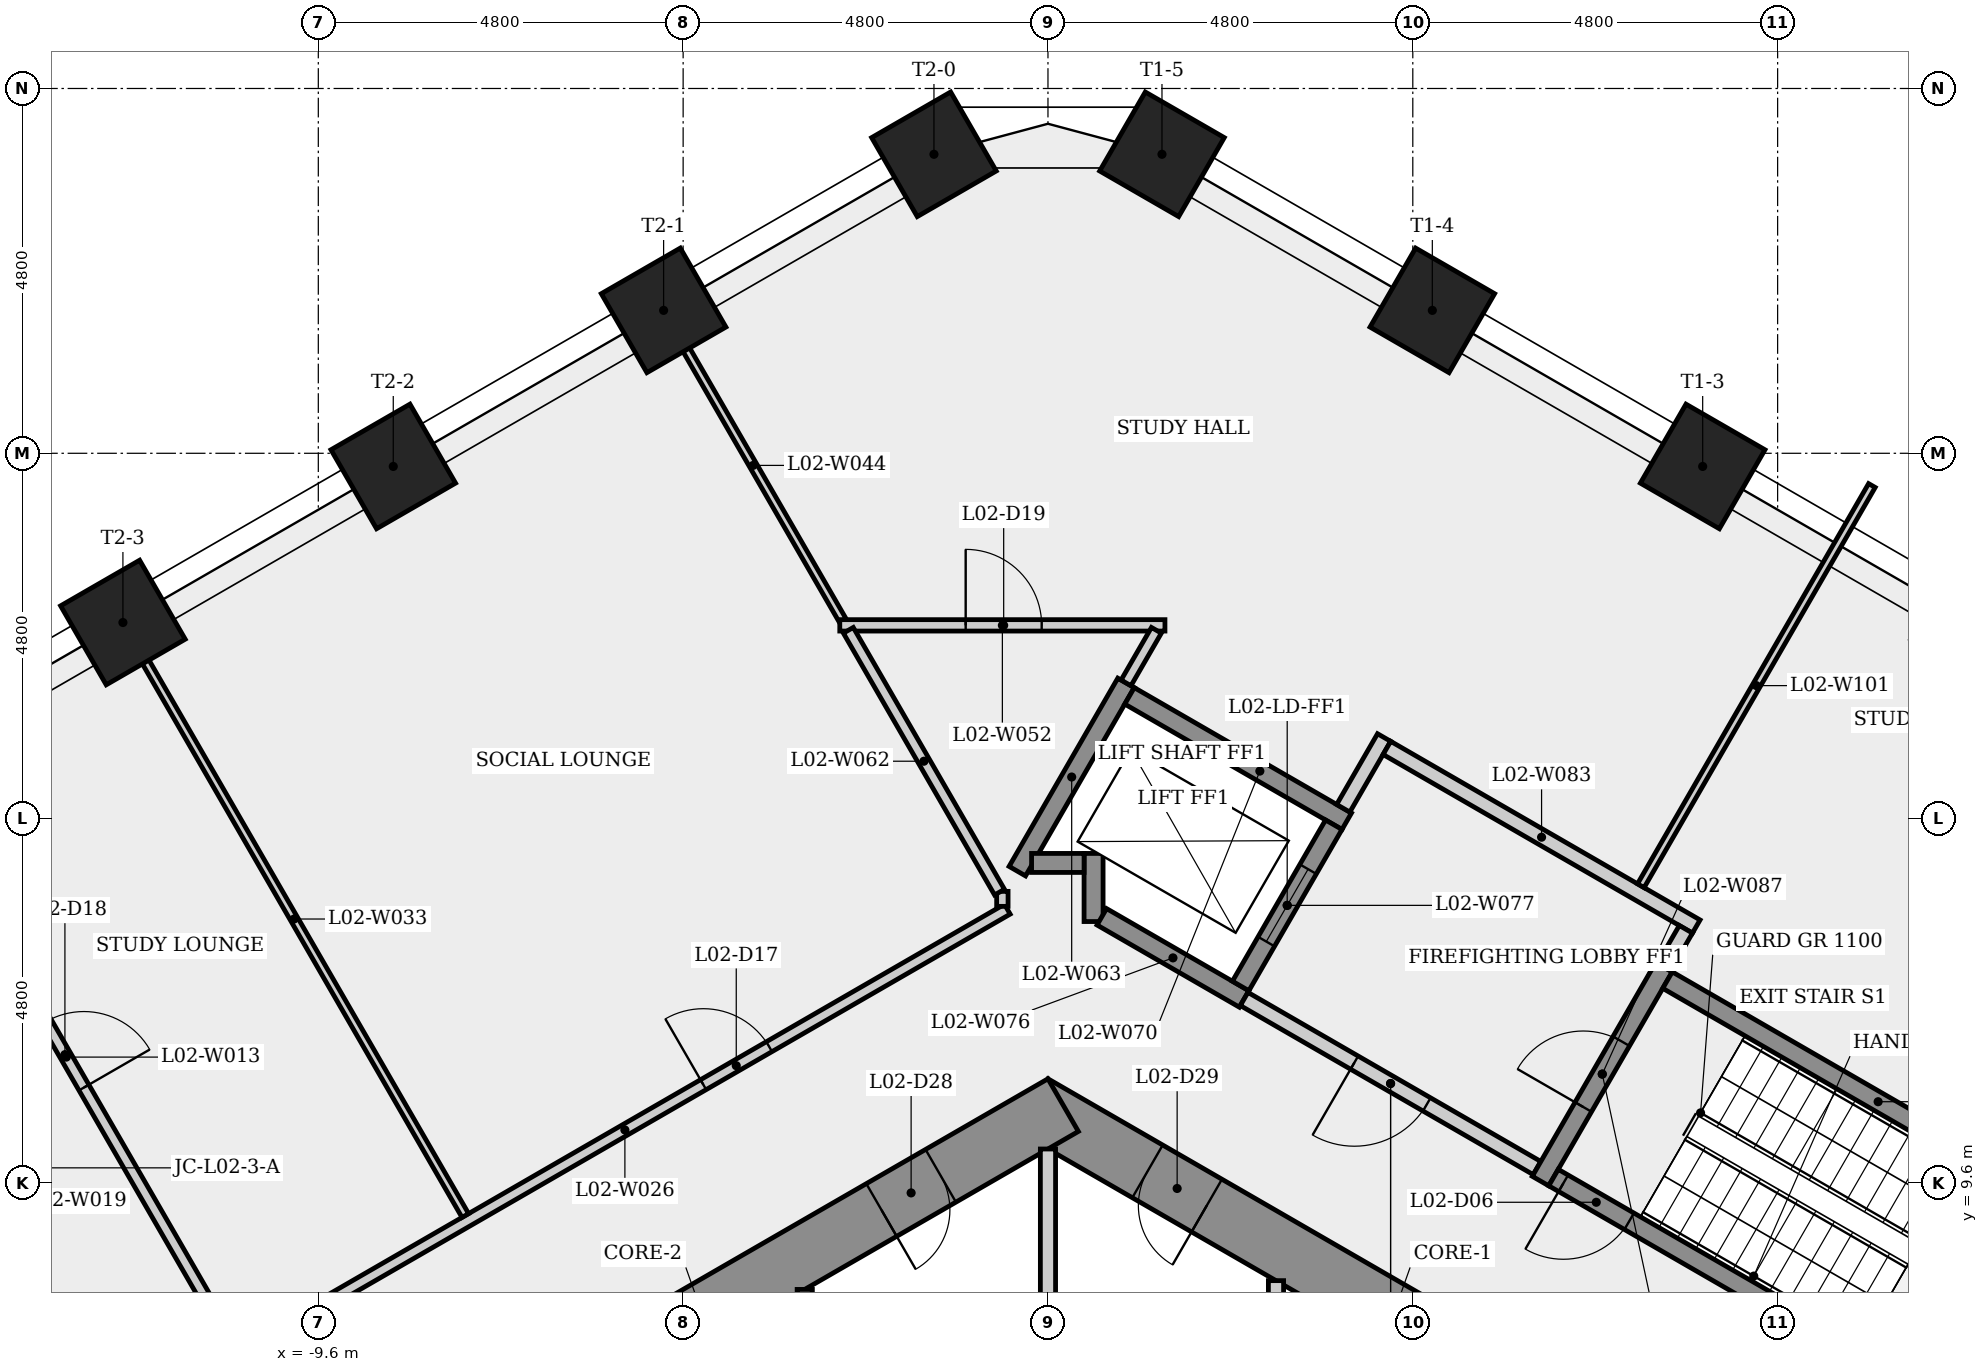
"""IFC4 building model, lengths in metres.
Left out: names, types, materials, properties, quantities, classifications, styles, units other than length and angle.
Written with IfcOpenShell. Run it as: python <this file> out.ifc"""

import sys

from ifc_helpers import new_model, si_unit, direction, frame, frame_2d, origin, origin_2d, place, context, subcontext, project, spatial, rectangle, extrude, element, fill, save


model = new_model("IFC4")
c1 = context("Model", 3, precision=1e-05, world=origin(), true_north=direction((0.0, 1.0)))
c2 = subcontext(c1, "Body", "Model", "MODEL_VIEW")
j1 = project(units=[si_unit("LENGTHUNIT", "METRE"), si_unit("PLANEANGLEUNIT", "RADIAN")], contexts=[c1])
p1 = place(None, origin())
s1 = spatial("IfcSite", under=j1, at=p1, CompositionType="ELEMENT")
p2 = place(p1, origin())
s2 = spatial("IfcBuilding", under=s1, at=p2, CompositionType="ELEMENT")
p3 = place(p2, frame((0.0, 0.0, 11.5)))
s3 = spatial("IfcBuildingStorey", under=s2, at=p3, CompositionType="ELEMENT", Elevation=11.5)
p4 = place(p3, frame((9.3, 5.138, 0.0), z_axis=(0.0, 0.0, 1.0), x_axis=(-0.866023993627, 0.500002442456, 0.0)))
e1 = element("IfcWall", 1, at=p4, inside=s3, PredefinedType="SHEAR", context=c2, shape_type="SweptSolid", body=[
    extrude(rectangle(XDim=10.97, YDim=0.8, at=frame_2d((5.485, 0.0))), origin(), (0.0, 0.0, 1.0), 4.5),
])
p5 = place(p4, frame((8.326, 0.0, 0.0)))
e2 = element("IfcOpeningElement", 2, at=p5, cuts=e1, PredefinedType="OPENING", context=c2, shape_type="SweptSolid", body=[
    extrude(rectangle(XDim=0.9, YDim=2.1, at=frame_2d((0.45, 1.05))), frame((0.0, 0.41, 0.0), z_axis=(0.0, -1.0, 0.0), x_axis=(1.0, 0.0, 0.0)), (0.0, 0.0, 1.0), 0.82),
])
p6 = place(p4, frame((2.091, 0.0, 0.0)))
e3 = element("IfcOpeningElement", 3, at=p6, cuts=e1, PredefinedType="OPENING", context=c2, shape_type="SweptSolid", body=[
    extrude(rectangle(XDim=0.9, YDim=2.1, at=frame_2d((0.45, 1.05))), frame((0.0, 0.41, 0.0), z_axis=(0.0, -1.0, 0.0), x_axis=(1.0, 0.0, 0.0)), (0.0, 0.0, 1.0), 0.82),
])
p7 = place(p3, frame((0.2, 10.623, 0.0), z_axis=(0.0, 0.0, 1.0), x_axis=(-0.866023993627, -0.500002442456, 0.0)))
e4 = element("IfcWall", 4, at=p7, inside=s3, PredefinedType="SHEAR", context=c2, shape_type="SweptSolid", body=[
    extrude(rectangle(XDim=10.97, YDim=0.8, at=frame_2d((5.485, 0.0))), origin(), (0.0, 0.0, 1.0), 4.5),
])
p8 = place(p7, frame((7.944, 0.0, 0.0)))
e5 = element("IfcOpeningElement", 5, at=p8, cuts=e4, PredefinedType="OPENING", context=c2, shape_type="SweptSolid", body=[
    extrude(rectangle(XDim=0.9, YDim=2.1, at=frame_2d((0.45, 1.05))), frame((0.0, 0.41, 0.0), z_axis=(0.0, -1.0, 0.0), x_axis=(1.0, 0.0, 0.0)), (0.0, 0.0, 1.0), 0.82),
])
p9 = place(p7, frame((1.86, 0.0, 0.0)))
e6 = element("IfcOpeningElement", 6, at=p9, cuts=e4, PredefinedType="OPENING", context=c2, shape_type="SweptSolid", body=[
    extrude(rectangle(XDim=0.9, YDim=2.1, at=frame_2d((0.45, 1.05))), frame((0.0, 0.41, 0.0), z_axis=(0.0, -1.0, 0.0), x_axis=(1.0, 0.0, 0.0)), (0.0, 0.0, 1.0), 0.82),
])
for number, where, z_axis, x_axis in (
    (7, (8.614, 19.027, 0.0), (0.0, 0.0, 1.0), (0.5, 0.866, 0.0)),
    (8, (5.057, 21.08, 0.0), (0.0, 0.0, 1.0), (0.5, 0.866, 0.0)),
    (9, (1.5, 23.134, 0.0), (0.0, 0.0, 1.0), (0.5, 0.866, 0.0)),
    (10, (-1.5, 23.134, 0.0), (0.0, 0.0, 1.0), (-0.5, 0.866, 0.0)),
    (11, (-5.057, 21.08, 0.0), (0.0, 0.0, 1.0), (-0.5, 0.866, 0.0)),
    (12, (-8.614, 19.027, 0.0), (0.0, 0.0, 1.0), (-0.5, 0.866, 0.0)),
    (13, (-12.171, 16.973, 0.0), (0.0, 0.0, 1.0), (-0.5, 0.866, 0.0)),
):
    element("IfcColumn", number, at=place(p3, frame(where, z_axis=z_axis, x_axis=x_axis)), inside=s3, PredefinedType="COLUMN", context=c2, shape_type="SweptSolid", body=[
        extrude(rectangle(XDim=1.2, YDim=1.2, at=origin_2d()), origin(), (0.0, 0.0, 1.0), 4.5),
    ])
p10 = place(p3, frame((-15.205, 15.221, 0.0), z_axis=(0.0, 0.0, 1.0), x_axis=(0.500006245143, -0.86602179812, 0.0)))
e14 = element("IfcWall", 14, at=p10, inside=s3, PredefinedType="PARTITIONING", context=c2, shape_type="SweptSolid", body=[
    extrude(rectangle(XDim=9.16, YDim=0.15, at=frame_2d((4.58, 0.0))), origin(), (0.0, 0.0, 1.0), 4.1),
])
p11 = place(p10, frame((4.042, 0.0, 0.0)))
e15 = element("IfcOpeningElement", 15, at=p11, cuts=e14, PredefinedType="OPENING", context=c2, shape_type="SweptSolid", body=[
    extrude(rectangle(XDim=1.0, YDim=2.1, at=frame_2d((0.5, 1.05))), frame((0.0, 0.085, 0.0), z_axis=(0.0, -1.0, 0.0), x_axis=(1.0, 0.0, 0.0)), (0.0, 0.0, 1.0), 0.17),
])
p12 = place(p3, frame((-10.598, 7.391, 0.0), z_axis=(0.0, 0.0, 1.0), x_axis=(0.866022183431, 0.500005577774, 0.0)))
e16 = element("IfcWall", 16, at=p12, inside=s3, PredefinedType="PARTITIONING", context=c2, shape_type="SweptSolid", body=[
    extrude(rectangle(XDim=11.619, YDim=0.15, at=frame_2d((5.81, 0.0))), origin(), (0.0, 0.0, 1.0), 4.1),
])
p13 = place(p12, frame((7.001, 0.0, 0.0)))
e17 = element("IfcOpeningElement", 17, at=p13, cuts=e16, PredefinedType="OPENING", context=c2, shape_type="SweptSolid", body=[
    extrude(rectangle(XDim=1.0, YDim=2.1, at=frame_2d((0.5, 1.05))), frame((0.0, 0.085, 0.0), z_axis=(0.0, -1.0, 0.0), x_axis=(1.0, 0.0, 0.0)), (0.0, 0.0, 1.0), 0.17),
])
p14 = place(p3, frame((-7.666, 9.171, 0.0), z_axis=(0.0, 0.0, 1.0), x_axis=(-0.500009404554, 0.866019973994, 0.0)))
e18 = element("IfcWall", 18, at=p14, inside=s3, PredefinedType="PARTITIONING", context=c2, shape_type="SweptSolid", body=[
    extrude(rectangle(XDim=9.01, YDim=0.1, at=frame_2d((4.505, 0.0))), origin(), (0.0, 0.0, 1.0), 4.1),
])
p15 = place(p3, frame((-5.057, 21.08, 0.0), z_axis=(0.0, 0.0, 1.0), x_axis=(0.500018540756, -0.866014699009, 0.0)))
e19 = element("IfcWall", 19, at=p15, inside=s3, PredefinedType="PARTITIONING", context=c2, shape_type="SweptSolid", body=[
    extrude(rectangle(XDim=4.711, YDim=0.1, at=frame_2d((2.355, 0.0))), origin(), (0.0, 0.0, 1.0), 4.1),
])
p16 = place(p3, frame((-3.2, 8.198, 0.0), z_axis=(0.0, 0.0, 1.0), x_axis=(0.0, -1.0, 0.0)))
e20 = element("IfcWall", 20, at=p16, inside=s3, PredefinedType="PARTITIONING", context=c2, shape_type="SweptSolid", body=[
    extrude(rectangle(XDim=2.924, YDim=0.2, at=frame_2d((1.462, 0.0))), origin(), (0.0, 0.0, 1.0), 4.1),
])
p17 = place(p3, frame((-2.739, 16.936, 0.0), z_axis=(0.0, 0.0, 1.0), x_axis=(1.0, 0.0, 0.0)))
e21 = element("IfcWall", 21, at=p17, inside=s3, PredefinedType="PARTITIONING", context=c2, shape_type="SweptSolid", body=[
    extrude(rectangle(XDim=4.278, YDim=0.15, at=frame_2d((2.139, 0.0))), origin(), (0.0, 0.0, 1.0), 4.1),
])
p18 = place(p17, frame((1.656, 0.0, 0.0)))
e22 = element("IfcOpeningElement", 22, at=p18, cuts=e21, PredefinedType="OPENING", context=c2, shape_type="SweptSolid", body=[
    extrude(rectangle(XDim=1.0, YDim=2.1, at=frame_2d((0.5, 1.05))), frame((0.0, 0.085, 0.0), z_axis=(0.0, -1.0, 0.0), x_axis=(1.0, 0.0, 0.0)), (0.0, 0.0, 1.0), 0.17),
])
p19 = place(p3, frame((-0.6, 13.239, 0.0), z_axis=(0.0, 0.0, 1.0), x_axis=(0.0, 1.0, 0.0)))
e23 = element("IfcWall", 23, at=p19, inside=s3, PredefinedType="PARTITIONING", context=c2, shape_type="SweptSolid", body=[
    extrude(rectangle(XDim=0.197, YDim=0.15, at=frame_2d((0.099, 0.0))), origin(), (0.0, 0.0, 1.0), 4.1),
])
p20 = place(p3, frame((-0.637, 13.426, 0.0), z_axis=(0.0, 0.0, 1.0), x_axis=(-0.500046503579, 0.865998553266, 0.0)))
e24 = element("IfcWall", 24, at=p20, inside=s3, PredefinedType="PARTITIONING", context=c2, shape_type="SweptSolid", body=[
    extrude(rectangle(XDim=3.978, YDim=0.15, at=frame_2d((1.989, 0.0))), origin(), (0.0, 0.0, 1.0), 4.1),
])
p21 = place(p3, frame((-0.403, 13.702, 0.0), z_axis=(0.0, 0.0, 1.0), x_axis=(0.499976111731, 0.866039195244, 0.0)))
e25 = element("IfcWall", 25, at=p21, inside=s3, PredefinedType="SHEAR", context=c2, shape_type="SweptSolid", body=[
    extrude(rectangle(XDim=2.861, YDim=0.25, at=frame_2d((1.43, 0.0))), origin(), (0.0, 0.0, 1.0), 4.1),
])
p22 = place(p3, frame((0.0, 10.046, 0.0), z_axis=(0.0, 0.0, 1.0), x_axis=(0.0, -1.0, 0.0)))
e26 = element("IfcWall", 26, at=p22, inside=s3, PredefinedType="PARTITIONING", context=c2, shape_type="SweptSolid", body=[
    extrude(rectangle(XDim=4.771, YDim=0.2, at=frame_2d((2.385, 0.0))), origin(), (0.0, 0.0, 1.0), 4.1),
])
p23 = place(p3, frame((0.6, 13.039, 0.0), z_axis=(0.0, 0.0, 1.0), x_axis=(0.0, 1.0, 0.0)))
e27 = element("IfcWall", 27, at=p23, inside=s3, PredefinedType="SHEAR", context=c2, shape_type="SweptSolid", body=[
    extrude(rectangle(XDim=0.896, YDim=0.25, at=frame_2d((0.448, 0.0))), origin(), (0.0, 0.0, 1.0), 4.1),
])
p24 = place(p3, frame((0.475, 13.81, 0.0), z_axis=(0.0, 0.0, 1.0), x_axis=(-1.0, 0.0, 0.0)))
e28 = element("IfcWall", 28, at=p24, inside=s3, PredefinedType="SHEAR", context=c2, shape_type="SweptSolid", body=[
    extrude(rectangle(XDim=0.691, YDim=0.25, at=frame_2d((0.345, 0.0))), origin(), (0.0, 0.0, 1.0), 4.5),
])
p25 = place(p3, frame((1.073, 16.008, 0.0), z_axis=(0.0, 0.0, 1.0), x_axis=(0.866040211805, -0.499974350878, 0.0)))
e29 = element("IfcWall", 29, at=p25, inside=s3, PredefinedType="SHEAR", context=c2, shape_type="SweptSolid", body=[
    extrude(rectangle(XDim=3.3, YDim=0.25, at=frame_2d((1.65, 0.0))), origin(), (0.0, 0.0, 1.0), 4.1),
])
p26 = place(p3, frame((1.427, 16.871, 0.0), z_axis=(0.0, 0.0, 1.0), x_axis=(-0.499951716245, -0.866053278629, 0.0)))
e30 = element("IfcWall", 30, at=p26, inside=s3, PredefinedType="PARTITIONING", context=c2, shape_type="SweptSolid", body=[
    extrude(rectangle(XDim=0.799, YDim=0.15, at=frame_2d((0.399, 0.0))), origin(), (0.0, 0.0, 1.0), 4.1),
])
p27 = place(p3, frame((2.581, 12.02, 0.0), z_axis=(0.0, 0.0, 1.0), x_axis=(-0.86603892542, 0.499976579108, 0.0)))
e31 = element("IfcWall", 31, at=p27, inside=s3, PredefinedType="SHEAR", context=c2, shape_type="SweptSolid", body=[
    extrude(rectangle(XDim=2.162, YDim=0.25, at=frame_2d((1.081, 0.0))), origin(), (0.0, 0.0, 1.0), 4.1),
])
p28 = place(p3, frame((2.535, 12.191, 0.0), z_axis=(0.0, 0.0, 1.0), x_axis=(0.500061746146, 0.865989751695, 0.0)))
e32 = element("IfcWall", 32, at=p28, inside=s3, PredefinedType="SHEAR", context=c2, shape_type="SweptSolid", body=[
    extrude(rectangle(XDim=2.45, YDim=0.25, at=frame_2d((1.225, 0.0))), origin(), (0.0, 0.0, 1.0), 4.5),
])
p29 = place(p28, frame((0.675, 0.0, 0.0)))
e33 = element("IfcOpeningElement", 33, at=p29, cuts=e32, PredefinedType="OPENING", context=c2, shape_type="SweptSolid", body=[
    extrude(rectangle(XDim=1.1, YDim=2.1, at=frame_2d((0.55, 1.05))), frame((0.0, 0.135, 0.0), z_axis=(0.0, -1.0, 0.0), x_axis=(1.0, 0.0, 0.0)), (0.0, 0.0, 1.0), 0.27),
])
p30 = place(p3, frame((3.0, 8.314, 0.0), z_axis=(0.0, 0.0, 1.0), x_axis=(0.0, -1.0, 0.0)))
e34 = element("IfcWall", 34, at=p30, inside=s3, PredefinedType="PARTITIONING", context=c2, shape_type="SweptSolid", body=[
    extrude(rectangle(XDim=3.039, YDim=0.2, at=frame_2d((1.52, 0.0))), origin(), (0.0, 0.0, 1.0), 4.1),
])
p31 = place(p3, frame((3.885, 14.529, 0.0), z_axis=(0.0, 0.0, 1.0), x_axis=(0.499997628298, 0.866026773083, 0.0)))
e35 = element("IfcWall", 35, at=p31, inside=s3, PredefinedType="PARTITIONING", context=c2, shape_type="SweptSolid", body=[
    extrude(rectangle(XDim=1.075, YDim=0.2, at=frame_2d((0.538, 0.0))), origin(), (0.0, 0.0, 1.0), 4.1),
])
p32 = place(p3, frame((4.459, 15.323, 0.0), z_axis=(0.0, 0.0, 1.0), x_axis=(0.866016039709, -0.500016218704, 0.0)))
e36 = element("IfcWall", 36, at=p32, inside=s3, PredefinedType="PARTITIONING", context=c2, shape_type="SweptSolid", body=[
    extrude(rectangle(XDim=4.7, YDim=0.2, at=frame_2d((2.35, 0.0))), origin(), (0.0, 0.0, 1.0), 4.1),
])
p33 = place(p3, frame((6.435, 9.795, 0.0), z_axis=(0.0, 0.0, 1.0), x_axis=(-0.866012907634, 0.500021643343, 0.0)))
e37 = element("IfcWall", 37, at=p33, inside=s3, PredefinedType="PARTITIONING", context=c2, shape_type="SweptSolid", body=[
    extrude(rectangle(XDim=4.45, YDim=0.2, at=frame_2d((2.225, 0.0))), origin(), (0.0, 0.0, 1.0), 4.1),
])
p34 = place(p33, frame((1.675, 0.0, 0.0)))
e38 = element("IfcOpeningElement", 38, at=p34, cuts=e37, PredefinedType="OPENING", context=c2, shape_type="SweptSolid", body=[
    extrude(rectangle(XDim=1.1, YDim=2.1, at=frame_2d((0.55, 1.05))), frame((0.0, 0.11, 0.0), z_axis=(0.0, -1.0, 0.0), x_axis=(1.0, 0.0, 0.0)), (0.0, 0.0, 1.0), 0.22),
])
p35 = place(p3, frame((6.48, 9.624, 0.0), z_axis=(0.0, 0.0, 1.0), x_axis=(0.500017246033, 0.866015446554, 0.0)))
e39 = element("IfcWall", 39, at=p35, inside=s3, PredefinedType="SHEAR", context=c2, shape_type="SweptSolid", body=[
    extrude(rectangle(XDim=3.25, YDim=0.25, at=frame_2d((1.625, 0.0))), origin(), (0.0, 0.0, 1.0), 4.1),
])
p36 = place(p35, frame((1.125, 0.0, 0.0)))
e40 = element("IfcOpeningElement", 40, at=p36, cuts=e39, PredefinedType="OPENING", context=c2, shape_type="SweptSolid", body=[
    extrude(rectangle(XDim=1.0, YDim=2.1, at=frame_2d((0.5, 1.05))), frame((0.0, 0.135, 0.0), z_axis=(0.0, -1.0, 0.0), x_axis=(1.0, 0.0, 0.0)), (0.0, 0.0, 1.0), 0.27),
])
p37 = place(p3, frame((8.151, 12.268, 0.0), z_axis=(0.0, 0.0, 1.0), x_axis=(0.866025499775, -0.499999833739, 0.0)))
e41 = element("IfcWall", 41, at=p37, inside=s3, PredefinedType="SHEAR", context=c2, shape_type="SweptSolid", body=[
    extrude(rectangle(XDim=6.4, YDim=0.25, at=frame_2d((3.2, 0.0))), origin(), (0.0, 0.0, 1.0), 4.1),
])
p38 = place(p3, frame((8.393, 12.937, 0.0), z_axis=(0.0, 0.0, 1.0), x_axis=(-0.500065409566, -0.86598763626, 0.0)))
e42 = element("IfcWall", 42, at=p38, inside=s3, PredefinedType="PARTITIONING", context=c2, shape_type="SweptSolid", body=[
    extrude(rectangle(XDim=0.575, YDim=0.2, at=frame_2d((0.288, 0.0))), origin(), (0.0, 0.0, 1.0), 4.1),
])
p39 = place(p3, frame((10.84, 18.776, 0.0), z_axis=(0.0, 0.0, 1.0), x_axis=(-0.500003976293, -0.866023108059, 0.0)))
e43 = element("IfcWall", 43, at=p39, inside=s3, PredefinedType="PARTITIONING", context=c2, shape_type="SweptSolid", body=[
    extrude(rectangle(XDim=6.081, YDim=0.1, at=frame_2d((3.04, 0.0))), origin(), (0.0, 0.0, 1.0), 4.1),
])
p40 = place(p3, frame((12.194, 6.47, 0.0), z_axis=(0.0, 0.0, 1.0), x_axis=(-0.866025499775, 0.499999833739, 0.0)))
e44 = element("IfcWall", 44, at=p40, inside=s3, PredefinedType="SHEAR", context=c2, shape_type="SweptSolid", body=[
    extrude(rectangle(XDim=6.4, YDim=0.25, at=frame_2d((3.2, 0.0))), origin(), (0.0, 0.0, 1.0), 4.1),
])
p41 = place(p40, frame((5.25, 0.0, 0.0)))
e45 = element("IfcOpeningElement", 45, at=p41, cuts=e44, PredefinedType="OPENING", context=c2, shape_type="SweptSolid", body=[
    extrude(rectangle(XDim=1.0, YDim=2.1, at=frame_2d((0.5, 1.05))), frame((0.0, 0.135, 0.0), z_axis=(0.0, -1.0, 0.0), x_axis=(1.0, 0.0, 0.0)), (0.0, 0.0, 1.0), 0.27),
])
p42 = place(p41, origin())
e46 = element("IfcDoor", 46, at=p42, inside=s3, OperationType="SINGLE_SWING_RIGHT", PredefinedType="DOOR", context=c2, shape_type="SweptSolid", body=[
    extrude(rectangle(XDim=1.0, YDim=2.1, at=frame_2d((0.5, 1.05))), frame((0.0, 0.025, 0.0), z_axis=(0.0, -1.0, 0.0), x_axis=(1.0, 0.0, 0.0)), (0.0, 0.0, 1.0), 0.05),
])
fill(e45, e46)
p43 = place(p36, origin())
e47 = element("IfcDoor", 47, at=p43, inside=s3, OperationType="SINGLE_SWING_LEFT", PredefinedType="DOOR", context=c2, shape_type="SweptSolid", body=[
    extrude(rectangle(XDim=1.0, YDim=2.1, at=frame_2d((0.5, 1.05))), frame((0.0, 0.025, 0.0), z_axis=(0.0, -1.0, 0.0), x_axis=(1.0, 0.0, 0.0)), (0.0, 0.0, 1.0), 0.05),
])
fill(e40, e47)
p44 = place(p34, origin())
e48 = element("IfcDoor", 48, at=p44, inside=s3, OperationType="SINGLE_SWING_RIGHT", PredefinedType="DOOR", context=c2, shape_type="SweptSolid", body=[
    extrude(rectangle(XDim=1.1, YDim=2.1, at=frame_2d((0.55, 1.05))), frame((0.0, 0.025, 0.0), z_axis=(0.0, -1.0, 0.0), x_axis=(1.0, 0.0, 0.0)), (0.0, 0.0, 1.0), 0.05),
])
fill(e38, e48)
p45 = place(p29, origin())
e49 = element("IfcDoor", 49, at=p45, inside=s3, OperationType="SLIDING_TO_LEFT", PredefinedType="DOOR", context=c2, shape_type="SweptSolid", body=[
    extrude(rectangle(XDim=1.1, YDim=2.1, at=frame_2d((0.55, 1.05))), frame((0.0, 0.025, 0.0), z_axis=(0.0, -1.0, 0.0), x_axis=(1.0, 0.0, 0.0)), (0.0, 0.0, 1.0), 0.05),
])
fill(e33, e49)
p46 = place(p13, origin())
e50 = element("IfcDoor", 50, at=p46, inside=s3, OperationType="SINGLE_SWING_LEFT", PredefinedType="DOOR", context=c2, shape_type="SweptSolid", body=[
    extrude(rectangle(XDim=1.0, YDim=2.1, at=frame_2d((0.5, 1.05))), frame((0.0, 0.025, 0.0), z_axis=(0.0, -1.0, 0.0), x_axis=(1.0, 0.0, 0.0)), (0.0, 0.0, 1.0), 0.05),
])
fill(e17, e50)
p47 = place(p11, origin())
e51 = element("IfcDoor", 51, at=p47, inside=s3, OperationType="SINGLE_SWING_RIGHT", PredefinedType="DOOR", context=c2, shape_type="SweptSolid", body=[
    extrude(rectangle(XDim=1.0, YDim=2.1, at=frame_2d((0.5, 1.05))), frame((0.0, 0.025, 0.0), z_axis=(0.0, -1.0, 0.0), x_axis=(1.0, 0.0, 0.0)), (0.0, 0.0, 1.0), 0.05),
])
fill(e15, e51)
p48 = place(p18, origin())
e52 = element("IfcDoor", 52, at=p48, inside=s3, OperationType="SINGLE_SWING_LEFT", PredefinedType="DOOR", context=c2, shape_type="SweptSolid", body=[
    extrude(rectangle(XDim=1.0, YDim=2.1, at=frame_2d((0.5, 1.05))), frame((0.0, 0.025, 0.0), z_axis=(0.0, -1.0, 0.0), x_axis=(1.0, 0.0, 0.0)), (0.0, 0.0, 1.0), 0.05),
])
fill(e22, e52)
p49 = place(p9, origin())
e53 = element("IfcDoor", 53, at=p49, inside=s3, OperationType="SINGLE_SWING_RIGHT", PredefinedType="DOOR", context=c2, shape_type="SweptSolid", body=[
    extrude(rectangle(XDim=0.9, YDim=2.1, at=frame_2d((0.45, 1.05))), frame((0.0, 0.025, 0.0), z_axis=(0.0, -1.0, 0.0), x_axis=(1.0, 0.0, 0.0)), (0.0, 0.0, 1.0), 0.05),
])
fill(e6, e53)
p50 = place(p5, origin())
e54 = element("IfcDoor", 54, at=p50, inside=s3, OperationType="SINGLE_SWING_LEFT", PredefinedType="DOOR", context=c2, shape_type="SweptSolid", body=[
    extrude(rectangle(XDim=0.9, YDim=2.1, at=frame_2d((0.45, 1.05))), frame((0.0, 0.025, 0.0), z_axis=(0.0, -1.0, 0.0), x_axis=(1.0, 0.0, 0.0)), (0.0, 0.0, 1.0), 0.05),
])
fill(e2, e54)
save(model, sys.argv[1])
